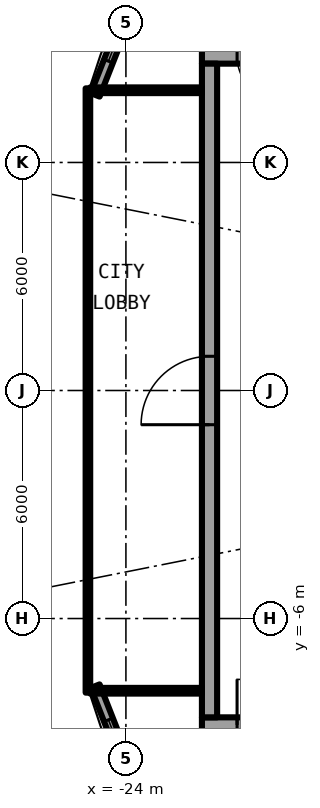
"""IFC4 building model, lengths in metres.
Left out: names, types, materials, properties, quantities, classifications, styles, units other than length and angle.
Written with IfcOpenShell. Run it as: python <this file> out.ifc"""

import sys

from ifc_helpers import new_model, si_unit, direction, frame, frame_2d, origin, place, context, subcontext, project, spatial, rectangle, extrude, element, fill, save


model = new_model("IFC4")
c1 = context("Model", 3, precision=1e-05, world=origin(), true_north=direction((0.0, 1.0)))
c2 = subcontext(c1, "Body", "Model", "MODEL_VIEW")
j1 = project(units=[si_unit("LENGTHUNIT", "METRE"), si_unit("PLANEANGLEUNIT", "RADIAN")], contexts=[c1])
p1 = place(None, origin())
s1 = spatial("IfcSite", under=j1, at=p1, CompositionType="ELEMENT")
p2 = place(p1, origin())
s2 = spatial("IfcBuilding", under=s1, at=p2, CompositionType="ELEMENT")
p3 = place(p2, frame((0.0, 0.0, 243.2)))
s3 = spatial("IfcBuildingStorey", under=s2, at=p3, CompositionType="ELEMENT", Elevation=243.2)
p4 = place(p3, frame((-24.809, -7.779, 0.0), z_axis=(0.0, 0.0, 1.0), x_axis=(0.366351636034, -0.930476479432, 0.0)))
e1 = element("IfcWall", 1, at=p4, inside=s3, PredefinedType="SOLIDWALL", context=c2, shape_type="SweptSolid", body=[
    extrude(rectangle(XDim=3.705, YDim=0.25, at=frame_2d((1.852, 0.0))), origin(), (0.0, 0.0, 1.0), 2.7),
])
p5 = place(p4, frame((0.952, 0.0, 0.3)))
e2 = element("IfcOpeningElement", 2, at=p5, cuts=e1, PredefinedType="OPENING", context=c2, shape_type="SweptSolid", body=[
    extrude(rectangle(XDim=1.8, YDim=2.1, at=frame_2d((0.9, 1.05))), frame((0.0, 0.135, 0.0), z_axis=(0.0, -1.0, 0.0), x_axis=(1.0, 0.0, 0.0)), (0.0, 0.0, 1.0), 0.27),
])
p6 = place(p3, frame((-23.452, 11.226, 0.0), z_axis=(0.0, 0.0, 1.0), x_axis=(-0.366351636034, -0.930476479432, 0.0)))
e3 = element("IfcWall", 3, at=p6, inside=s3, PredefinedType="SOLIDWALL", context=c2, shape_type="SweptSolid", body=[
    extrude(rectangle(XDim=3.705, YDim=0.25, at=frame_2d((1.852, 0.0))), origin(), (0.0, 0.0, 1.0), 2.7),
])
p7 = place(p6, frame((0.952, 0.0, 0.3)))
e4 = element("IfcOpeningElement", 4, at=p7, cuts=e3, PredefinedType="OPENING", context=c2, shape_type="SweptSolid", body=[
    extrude(rectangle(XDim=1.8, YDim=2.1, at=frame_2d((0.9, 1.05))), frame((0.0, 0.135, 0.0), z_axis=(0.0, -1.0, 0.0), x_axis=(1.0, 0.0, 0.0)), (0.0, 0.0, 1.0), 0.27),
])
p8 = place(p3, frame((-22.0, -8.8, 0.0), z_axis=(0.0, 0.0, 1.0), x_axis=(1.0, 0.0, 0.0)))
e5 = element("IfcWall", 5, at=p8, inside=s3, PredefinedType="SHEAR", context=c2, shape_type="SweptSolid", body=[
    extrude(rectangle(XDim=13.4, YDim=0.4, at=frame_2d((6.7, 0.0))), origin(), (0.0, 0.0, 1.0), 3.05),
])
p9 = place(p8, frame((0.925, 0.0, 0.0)))
e6 = element("IfcOpeningElement", 6, at=p9, cuts=e5, PredefinedType="OPENING", context=c2, shape_type="SweptSolid", body=[
    extrude(rectangle(XDim=1.2, YDim=2.3, at=frame_2d((0.6, 1.15))), frame((0.0, 0.21, 0.0), z_axis=(0.0, -1.0, 0.0), x_axis=(1.0, 0.0, 0.0)), (0.0, 0.0, 1.0), 0.42),
])
p10 = place(p3, frame((-8.6, 8.8, 0.0), z_axis=(0.0, 0.0, 1.0), x_axis=(-1.0, 0.0, 0.0)))
e7 = element("IfcWall", 7, at=p10, inside=s3, PredefinedType="SHEAR", context=c2, shape_type="SweptSolid", body=[
    extrude(rectangle(XDim=13.4, YDim=0.4, at=frame_2d((6.7, 0.0))), origin(), (0.0, 0.0, 1.0), 3.05),
])
p11 = place(p10, frame((11.275, 0.0, 0.0)))
e8 = element("IfcOpeningElement", 8, at=p11, cuts=e7, PredefinedType="OPENING", context=c2, shape_type="SweptSolid", body=[
    extrude(rectangle(XDim=1.2, YDim=2.3, at=frame_2d((0.6, 1.15))), frame((0.0, 0.21, 0.0), z_axis=(0.0, -1.0, 0.0), x_axis=(1.0, 0.0, 0.0)), (0.0, 0.0, 1.0), 0.42),
])
p12 = place(p3, frame((-21.8, -8.6, 0.0), z_axis=(0.0, 0.0, 1.0), x_axis=(0.0, 1.0, 0.0)))
e9 = element("IfcWall", 9, at=p12, inside=s3, PredefinedType="SHEAR", context=c2, shape_type="SweptSolid", body=[
    extrude(rectangle(XDim=17.2, YDim=0.4, at=frame_2d((8.6, 0.0))), origin(), (0.0, 0.0, 1.0), 3.05),
])
p13 = place(p12, frame((7.7, 0.0, 0.0)))
e10 = element("IfcOpeningElement", 10, at=p13, cuts=e9, PredefinedType="OPENING", context=c2, shape_type="SweptSolid", body=[
    extrude(rectangle(XDim=1.8, YDim=2.3, at=frame_2d((0.9, 1.15))), frame((0.0, 0.21, 0.0), z_axis=(0.0, -1.0, 0.0), x_axis=(1.0, 0.0, 0.0)), (0.0, 0.0, 1.0), 0.42),
])
for number, where, z_axis, x_axis in (
    (11, (-22.0, 7.9, 0.0), (0.0, 0.0, 1.0), (-1.0, 0.0, 0.0)),
    (12, (-22.0, -7.9, 0.0), (0.0, 0.0, 1.0), (-1.0, 0.0, 0.0)),
):
    element("IfcWall", number, at=place(p3, frame(where, z_axis=z_axis, x_axis=x_axis)), inside=s3, PredefinedType="PARTITIONING", context=c2, shape_type="SweptSolid", body=[
        extrude(rectangle(XDim=2.94, YDim=0.15, at=frame_2d((1.47, 0.0))), origin(), (0.0, 0.0, 1.0), 2.7),
    ])
p14 = place(p3, frame((-25.0, 7.95, 0.0), z_axis=(0.0, 0.0, 1.0), x_axis=(0.0, -1.0, 0.0)))
e13 = element("IfcWall", 13, at=p14, inside=s3, PredefinedType="PARTITIONING", context=c2, shape_type="SweptSolid", body=[
    extrude(rectangle(XDim=15.9, YDim=0.12, at=frame_2d((7.95, 0.0))), origin(), (0.0, 0.0, 1.0), 2.7),
])
p15 = place(p14, frame((0.95, 0.0, 0.1)))
e14 = element("IfcOpeningElement", 14, at=p15, cuts=e13, PredefinedType="OPENING", context=c2, shape_type="SweptSolid", body=[
    extrude(rectangle(XDim=14.0, YDim=2.35, at=frame_2d((7.0, 1.175))), frame((0.0, 0.07, 0.0), z_axis=(0.0, -1.0, 0.0), x_axis=(1.0, 0.0, 0.0)), (0.0, 0.0, 1.0), 0.14),
])
p16 = place(p5, origin())
e15 = element("IfcWindow", 15, at=p16, inside=s3, PartitioningType="SINGLE_PANEL", PredefinedType="WINDOW", context=c2, shape_type="SweptSolid", body=[
    extrude(rectangle(XDim=1.8, YDim=2.1, at=frame_2d((0.9, 1.05))), frame((0.0, 0.03, 0.0), z_axis=(0.0, -1.0, 0.0), x_axis=(1.0, 0.0, 0.0)), (0.0, 0.0, 1.0), 0.06),
])
fill(e2, e15)
p17 = place(p7, origin())
e16 = element("IfcWindow", 16, at=p17, inside=s3, PartitioningType="SINGLE_PANEL", PredefinedType="WINDOW", context=c2, shape_type="SweptSolid", body=[
    extrude(rectangle(XDim=1.8, YDim=2.1, at=frame_2d((0.9, 1.05))), frame((0.0, 0.03, 0.0), z_axis=(0.0, -1.0, 0.0), x_axis=(1.0, 0.0, 0.0)), (0.0, 0.0, 1.0), 0.06),
])
fill(e4, e16)
p18 = place(p9, origin())
e17 = element("IfcDoor", 17, at=p18, inside=s3, OperationType="SINGLE_SWING_RIGHT", PredefinedType="DOOR", context=c2, shape_type="SweptSolid", body=[
    extrude(rectangle(XDim=1.2, YDim=2.3, at=frame_2d((0.6, 1.15))), frame((0.0, 0.025, 0.0), z_axis=(0.0, -1.0, 0.0), x_axis=(1.0, 0.0, 0.0)), (0.0, 0.0, 1.0), 0.05),
])
fill(e6, e17)
p19 = place(p11, origin())
e18 = element("IfcDoor", 18, at=p19, inside=s3, OperationType="SINGLE_SWING_LEFT", PredefinedType="DOOR", context=c2, shape_type="SweptSolid", body=[
    extrude(rectangle(XDim=1.2, YDim=2.3, at=frame_2d((0.6, 1.15))), frame((0.0, 0.025, 0.0), z_axis=(0.0, -1.0, 0.0), x_axis=(1.0, 0.0, 0.0)), (0.0, 0.0, 1.0), 0.05),
])
fill(e8, e18)
p20 = place(p13, origin())
e19 = element("IfcDoor", 19, at=p20, inside=s3, OperationType="SINGLE_SWING_LEFT", PredefinedType="DOOR", context=c2, shape_type="SweptSolid", body=[
    extrude(rectangle(XDim=1.8, YDim=2.3, at=frame_2d((0.9, 1.15))), frame((0.0, 0.025, 0.0), z_axis=(0.0, -1.0, 0.0), x_axis=(1.0, 0.0, 0.0)), (0.0, 0.0, 1.0), 0.05),
])
fill(e10, e19)
p21 = place(p15, origin())
e20 = element("IfcWindow", 20, at=p21, inside=s3, PartitioningType="SINGLE_PANEL", PredefinedType="WINDOW", context=c2, shape_type="SweptSolid", body=[
    extrude(rectangle(XDim=14.0, YDim=2.35, at=frame_2d((7.0, 1.175))), frame((0.0, 0.03, 0.0), z_axis=(0.0, -1.0, 0.0), x_axis=(1.0, 0.0, 0.0)), (0.0, 0.0, 1.0), 0.06),
])
fill(e14, e20)
save(model, sys.argv[1])
